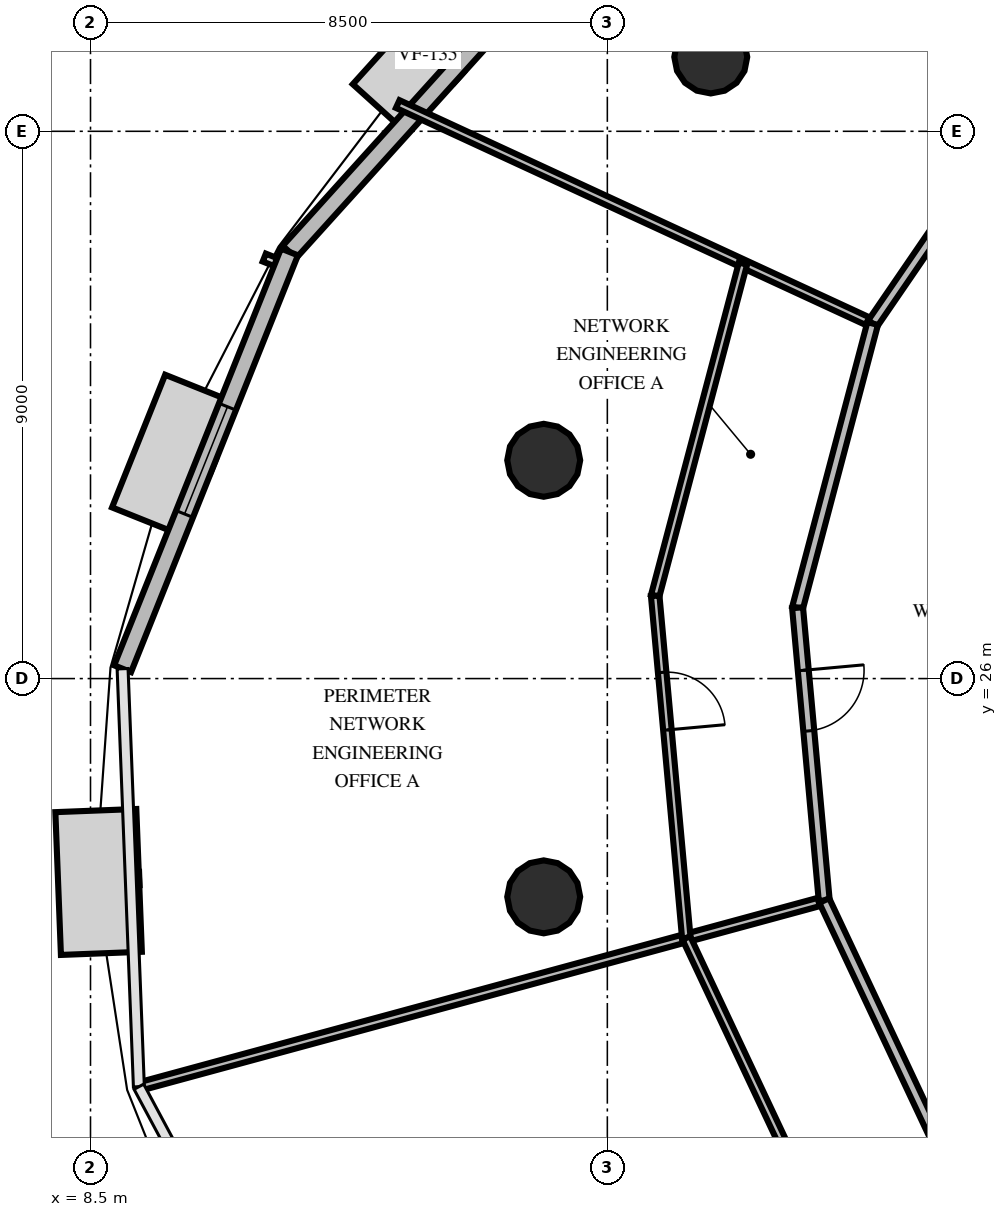
"""IFC4 building model, lengths in metres.
Left out: names, types, materials, properties, quantities, classifications, styles, units other than length and angle.
Written with IfcOpenShell. Run it as: python <this file> out.ifc"""

import sys

from ifc_helpers import new_model, si_unit, direction, frame, frame_2d, origin, origin_2d, place, context, subcontext, project, spatial, rectangle, circle, extrude, element, fill, save


model = new_model("IFC4")
c1 = context("Model", 3, precision=1e-05, world=origin(), true_north=direction((0.0, 1.0)))
c2 = subcontext(c1, "Body", "Model", "MODEL_VIEW")
j1 = project(units=[si_unit("LENGTHUNIT", "METRE"), si_unit("PLANEANGLEUNIT", "RADIAN")], contexts=[c1])
p1 = place(None, origin())
s1 = spatial("IfcSite", under=j1, at=p1, CompositionType="ELEMENT")
p2 = place(p1, origin())
s2 = spatial("IfcBuilding", under=s1, at=p2, CompositionType="ELEMENT")
p3 = place(p2, frame((0.0, 0.0, 97.8)))
s3 = spatial("IfcBuildingStorey", under=s2, at=p3, CompositionType="ELEMENT", Elevation=97.8)
for number, where, z_axis, x_axis in (
    (1, (18.701, 36.222, 0.0), (0.0, 0.0, 1.0), (1.0, 0.0, 0.0)),
    (2, (15.954, 29.59, 0.0), (0.0, 0.0, 1.0), (1.0, 0.0, 0.0)),
    (3, (15.954, 22.41, 0.0), (0.0, 0.0, 1.0), (1.0, 0.0, 0.0)),
):
    element("IfcColumn", number, at=place(p3, frame(where, z_axis=z_axis, x_axis=x_axis)), inside=s3, PredefinedType="COLUMN", context=c2, shape_type="SweptSolid", body=[
        extrude(circle(Radius=0.6, at=origin_2d()), origin(), (0.0, 0.0, 1.0), 4.0),
    ])
p4 = place(p3, frame((17.198, 39.024, 0.0), z_axis=(0.0, 0.0, 1.0), x_axis=(-0.670180169564, -0.742198450768, 0.0)))
e4 = element("IfcWall", 4, at=p4, inside=s3, PredefinedType="SOLIDWALL", context=c2, shape_type="SweptSolid", body=[
    extrude(rectangle(XDim=8.095, YDim=0.3, at=frame_2d((4.048, 0.0))), origin(), (0.0, 0.0, 1.0), 2.9),
])
p5 = place(p4, frame((1.615, 0.0, 0.8)))
e5 = element("IfcOpeningElement", 5, at=p5, cuts=e4, PredefinedType="OPENING", context=c2, shape_type="SweptSolid", body=[
    extrude(rectangle(XDim=1.9, YDim=1.95, at=frame_2d((0.95, 0.975))), frame((0.0, 0.16, 0.0), z_axis=(0.0, -1.0, 0.0), x_axis=(1.0, 0.0, 0.0)), (0.0, 0.0, 1.0), 0.32),
])
p6 = place(p3, frame((11.772, 33.016, 0.0), z_axis=(0.0, 0.0, 1.0), x_axis=(-0.371704219928, -0.928351212035, 0.0)))
e6 = element("IfcWall", 6, at=p6, inside=s3, PredefinedType="SOLIDWALL", context=c2, shape_type="SweptSolid", body=[
    extrude(rectangle(XDim=7.383, YDim=0.3, at=frame_2d((3.692, 0.0))), origin(), (0.0, 0.0, 1.0), 2.9),
])
p7 = place(p6, frame((2.742, 0.0, 0.8)))
e7 = element("IfcOpeningElement", 7, at=p7, cuts=e6, PredefinedType="OPENING", context=c2, shape_type="SweptSolid", body=[
    extrude(rectangle(XDim=1.9, YDim=1.95, at=frame_2d((0.95, 0.975))), frame((0.0, 0.16, 0.0), z_axis=(0.0, -1.0, 0.0), x_axis=(1.0, 0.0, 0.0)), (0.0, 0.0, 1.0), 0.32),
])
p8 = place(p3, frame((21.364, 31.839, 0.0), z_axis=(0.0, 0.0, 1.0), x_axis=(-0.907785748515, 0.419434184101, 0.0)))
e8 = element("IfcWall", 8, at=p8, inside=s3, PredefinedType="PARTITIONING", context=c2, shape_type="SweptSolid", body=[
    extrude(rectangle(XDim=8.605, YDim=0.14, at=frame_2d((4.302, 0.0))), origin(), (0.0, 0.0, 1.0), 2.8),
])
p9 = place(p3, frame((23.987, 35.67, 0.0), z_axis=(0.0, 0.0, 1.0), x_axis=(-0.564972304396, -0.825109868603, 0.0)))
e9 = element("IfcWall", 9, at=p9, inside=s3, PredefinedType="PARTITIONING", context=c2, shape_type="SweptSolid", body=[
    extrude(rectangle(XDim=4.643, YDim=0.18, at=frame_2d((2.321, 0.0))), origin(), (0.0, 0.0, 1.0), 2.8),
])
p10 = place(p3, frame((20.567, 22.35, 0.0), z_axis=(0.0, 0.0, 1.0), x_axis=(-0.965018061435, -0.262183411194, 0.0)))
e10 = element("IfcWall", 10, at=p10, inside=s3, PredefinedType="PARTITIONING", context=c2, shape_type="SweptSolid", body=[
    extrude(rectangle(XDim=11.68, YDim=0.14, at=frame_2d((5.84, 0.0))), origin(), (0.0, 0.0, 1.0), 2.8),
])
p11 = place(p3, frame((21.364, 31.839, 0.0), z_axis=(0.0, 0.0, 1.0), x_axis=(-0.255430312845, -0.966827469241, 0.0)))
e11 = element("IfcWall", 11, at=p11, inside=s3, PredefinedType="PARTITIONING", context=c2, shape_type="SweptSolid", body=[
    extrude(rectangle(XDim=4.834, YDim=0.18, at=frame_2d((2.417, 0.0))), origin(), (0.0, 0.0, 1.0), 2.8),
])
p12 = place(p3, frame((20.129, 27.165, 0.0), z_axis=(0.0, 0.0, 1.0), x_axis=(0.090599493513, -0.995887409186, 0.0)))
e12 = element("IfcWall", 12, at=p12, inside=s3, PredefinedType="PARTITIONING", context=c2, shape_type="SweptSolid", body=[
    extrude(rectangle(XDim=4.834, YDim=0.18, at=frame_2d((2.417, 0.0))), origin(), (0.0, 0.0, 1.0), 2.8),
])
p13 = place(p12, frame((1.034, 0.0, 0.0)))
e13 = element("IfcOpeningElement", 13, at=p13, cuts=e12, PredefinedType="OPENING", context=c2, shape_type="SweptSolid", body=[
    extrude(rectangle(XDim=1.0, YDim=2.15, at=frame_2d((0.5, 1.075))), frame((0.0, 0.1, 0.0), z_axis=(0.0, -1.0, 0.0), x_axis=(1.0, 0.0, 0.0)), (0.0, 0.0, 1.0), 0.2),
])
p14 = place(p3, frame((19.23, 32.824, 0.0), z_axis=(0.0, 0.0, 1.0), x_axis=(-0.255435320905, -0.966826146127, 0.0)))
e14 = element("IfcWall", 14, at=p14, inside=s3, PredefinedType="PARTITIONING", context=c2, shape_type="SweptSolid", body=[
    extrude(rectangle(XDim=5.651, YDim=0.14, at=frame_2d((2.825, 0.0))), origin(), (0.0, 0.0, 1.0), 2.8),
])
p15 = place(p3, frame((17.787, 27.361, 0.0), z_axis=(0.0, 0.0, 1.0), x_axis=(0.090648721683, -0.995882929494, 0.0)))
e15 = element("IfcWall", 15, at=p15, inside=s3, PredefinedType="PARTITIONING", context=c2, shape_type="SweptSolid", body=[
    extrude(rectangle(XDim=5.65, YDim=0.14, at=frame_2d((2.825, 0.0))), origin(), (0.0, 0.0, 1.0), 2.8),
])
p16 = place(p15, frame((1.265, 0.0, 0.0)))
e16 = element("IfcOpeningElement", 16, at=p16, cuts=e15, PredefinedType="OPENING", context=c2, shape_type="SweptSolid", body=[
    extrude(rectangle(XDim=0.95, YDim=2.15, at=frame_2d((0.475, 1.075))), frame((0.0, 0.08, 0.0), z_axis=(0.0, -1.0, 0.0), x_axis=(1.0, 0.0, 0.0)), (0.0, 0.0, 1.0), 0.16),
])
p17 = place(p3, frame((20.567, 22.35, 0.0), z_axis=(0.0, 0.0, 1.0), x_axis=(0.425775147607, -0.904829002453, 0.0)))
e17 = element("IfcWall", 17, at=p17, inside=s3, PredefinedType="PARTITIONING", context=c2, shape_type="SweptSolid", body=[
    extrude(rectangle(XDim=4.834, YDim=0.18, at=frame_2d((2.417, 0.0))), origin(), (0.0, 0.0, 1.0), 2.8),
])
p18 = place(p3, frame((18.299, 21.734, 0.0), z_axis=(0.0, 0.0, 1.0), x_axis=(0.425759581932, -0.904836326853, 0.0)))
e18 = element("IfcWall", 18, at=p18, inside=s3, PredefinedType="PARTITIONING", context=c2, shape_type="SweptSolid", body=[
    extrude(rectangle(XDim=5.651, YDim=0.14, at=frame_2d((2.825, 0.0))), origin(), (0.0, 0.0, 1.0), 2.8),
])
p19 = place(p7, origin())
e19 = element("IfcWindow", 19, at=p19, inside=s3, PartitioningType="SINGLE_PANEL", PredefinedType="WINDOW", context=c2, shape_type="SweptSolid", body=[
    extrude(rectangle(XDim=1.9, YDim=1.95, at=frame_2d((0.95, 0.975))), frame((0.0, 0.03, 0.0), z_axis=(0.0, -1.0, 0.0), x_axis=(1.0, 0.0, 0.0)), (0.0, 0.0, 1.0), 0.06),
])
fill(e7, e19)
p20 = place(p13, origin())
e20 = element("IfcDoor", 20, at=p20, inside=s3, OperationType="SINGLE_SWING_LEFT", PredefinedType="DOOR", context=c2, shape_type="SweptSolid", body=[
    extrude(rectangle(XDim=1.0, YDim=2.15, at=frame_2d((0.5, 1.075))), frame((0.0, 0.025, 0.0), z_axis=(0.0, -1.0, 0.0), x_axis=(1.0, 0.0, 0.0)), (0.0, 0.0, 1.0), 0.05),
])
fill(e13, e20)
p21 = place(p16, origin())
e21 = element("IfcDoor", 21, at=p21, inside=s3, OperationType="SINGLE_SWING_RIGHT", PredefinedType="DOOR", context=c2, shape_type="SweptSolid", body=[
    extrude(rectangle(XDim=0.95, YDim=2.15, at=frame_2d((0.475, 1.075))), frame((0.0, 0.025, 0.0), z_axis=(0.0, -1.0, 0.0), x_axis=(1.0, 0.0, 0.0)), (0.0, 0.0, 1.0), 0.05),
])
fill(e16, e21)
save(model, sys.argv[1])
